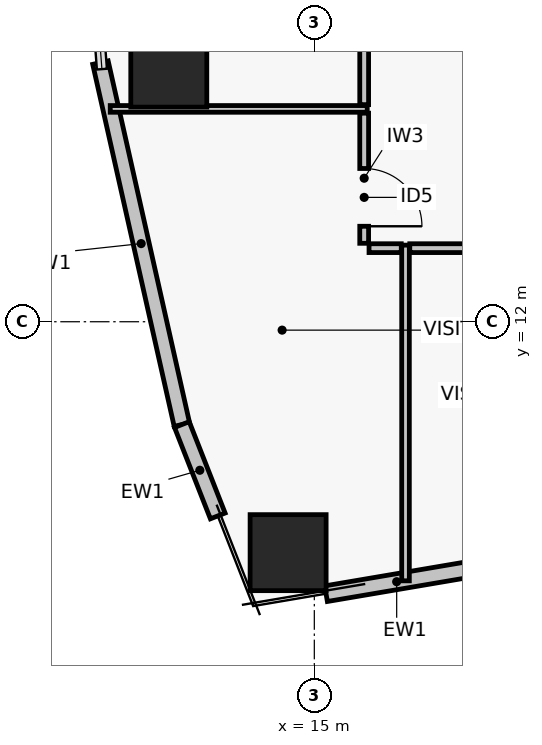
"""IFC4 building model, lengths in metres.
Left out: names, types, materials, properties, quantities, classifications, styles, units other than length and angle.
Written with IfcOpenShell. Run it as: python <this file> out.ifc"""

import sys

from ifc_helpers import new_model, si_unit, direction, frame, frame_2d, origin, origin_2d, place, context, subcontext, project, spatial, rectangle, hollow_rectangle, extrude, element, fill, save


model = new_model("IFC4")
c1 = context("Model", 3, precision=1e-05, world=origin(), true_north=direction((0.0, 1.0)))
c2 = subcontext(c1, "Body", "Model", "MODEL_VIEW")
j1 = project(units=[si_unit("LENGTHUNIT", "METRE"), si_unit("PLANEANGLEUNIT", "RADIAN")], contexts=[c1])
p1 = place(None, origin())
s1 = spatial("IfcSite", under=j1, at=p1, CompositionType="ELEMENT")
p2 = place(p1, origin())
s2 = spatial("IfcBuilding", under=s1, at=p2, CompositionType="ELEMENT")
p3 = place(p2, frame((0.0, 0.0, 79.68)))
s3 = spatial("IfcBuildingStorey", under=s2, at=p3, CompositionType="ELEMENT", Elevation=79.68)
for number, where, z_axis, x_axis in (
    (1, (12.607, 16.154, 0.0), (0.0, 0.0, 1.0), (1.0, 0.0, 0.0)),
    (2, (14.569, 8.203, 0.0), (0.0, 0.0, 1.0), (1.0, 0.0, 0.0)),
):
    element("IfcColumn", number, at=place(p3, frame(where, z_axis=z_axis, x_axis=x_axis)), inside=s3, PredefinedType="COLUMN", context=c2, shape_type="SweptSolid", body=[
        extrude(hollow_rectangle(XDim=1.25, YDim=1.25, WallThickness=0.05, at=origin_2d()), origin(), (0.0, 0.0, 1.0), 3.72),
    ])
p4 = place(p3, frame((12.822, 10.309, 0.0), z_axis=(0.0, 0.0, 1.0), x_axis=(-0.219535044336, 0.975604614743, 0.0)))
e3 = element("IfcWall", 3, at=p4, inside=s3, PredefinedType="PARTITIONING", context=c2, shape_type="SweptSolid", body=[
    extrude(rectangle(XDim=6.102, YDim=0.26, at=frame_2d((3.051, 0.0))), origin(), (0.0, 0.0, 1.0), 3.38),
])
p5 = place(p3, frame((13.412, 8.806, 0.0), z_axis=(0.0, 0.0, 1.0), x_axis=(-0.365488551504, 0.930815835018, 0.0)))
e4 = element("IfcWall", 4, at=p5, inside=s3, PredefinedType="PARTITIONING", context=c2, shape_type="SweptSolid", body=[
    extrude(rectangle(XDim=1.614, YDim=0.26, at=frame_2d((0.807, 0.0))), origin(), (0.0, 0.0, 1.0), 3.38),
])
p6 = place(p3, frame((17.516, 7.922, 0.0), z_axis=(0.0, 0.0, 1.0), x_axis=(-0.985905269947, -0.167304508875, 0.0)))
e5 = element("IfcWall", 5, at=p6, inside=s3, PredefinedType="PARTITIONING", context=c2, shape_type="SweptSolid", body=[
    extrude(rectangle(XDim=2.357, YDim=0.26, at=frame_2d((1.178, 0.0))), origin(), (0.0, 0.0, 1.0), 3.38),
])
p7 = place(p3, frame((15.82, 21.93, 0.0), z_axis=(0.0, 0.0, 1.0), x_axis=(0.0, -1.0, 0.0)))
e6 = element("IfcWall", 6, at=p7, inside=s3, PredefinedType="PARTITIONING", context=c2, shape_type="SweptSolid", body=[
    extrude(rectangle(XDim=6.36, YDim=0.145, at=frame_2d((3.18, 0.0))), origin(), (0.0, 0.0, 1.0), 2.51),
])
p8 = place(p7, frame((0.28, 0.0, 0.0)))
e7 = element("IfcOpeningElement", 7, at=p8, cuts=e6, PredefinedType="OPENING", context=c2, shape_type="SweptSolid", body=[
    extrude(rectangle(XDim=0.95, YDim=2.06, at=frame_2d((0.475, 1.03))), frame((0.0, 0.083, 0.0), z_axis=(0.0, -1.0, 0.0), x_axis=(1.0, 0.0, 0.0)), (0.0, 0.0, 1.0), 0.165),
])
p9 = place(p3, frame((15.82, 15.43, 0.0), z_axis=(0.0, 0.0, 1.0), x_axis=(0.0, -1.0, 0.0)))
e8 = element("IfcWall", 8, at=p9, inside=s3, PredefinedType="PARTITIONING", context=c2, shape_type="SweptSolid", body=[
    extrude(rectangle(XDim=2.14, YDim=0.145, at=frame_2d((1.07, 0.0))), origin(), (0.0, 0.0, 1.0), 2.91),
])
p10 = place(p9, frame((0.91, 0.0, 0.0)))
e9 = element("IfcOpeningElement", 9, at=p10, cuts=e8, PredefinedType="OPENING", context=c2, shape_type="SweptSolid", body=[
    extrude(rectangle(XDim=0.95, YDim=2.06, at=frame_2d((0.475, 1.03))), frame((0.0, 0.083, 0.0), z_axis=(0.0, -1.0, 0.0), x_axis=(1.0, 0.0, 0.0)), (0.0, 0.0, 1.0), 0.165),
])
p11 = place(p3, frame((15.9, 13.21, 0.0), z_axis=(0.0, 0.0, 1.0), x_axis=(1.0, 0.0, 0.0)))
e10 = element("IfcWall", 10, at=p11, inside=s3, PredefinedType="PARTITIONING", context=c2, shape_type="SweptSolid", body=[
    extrude(rectangle(XDim=0.53, YDim=0.145, at=frame_2d((0.265, 0.0))), origin(), (0.0, 0.0, 1.0), 2.51),
])
p12 = place(p3, frame((16.57, 13.21, 0.0), z_axis=(0.0, 0.0, 1.0), x_axis=(1.0, 0.0, 0.0)))
e11 = element("IfcWall", 11, at=p12, inside=s3, PredefinedType="PARTITIONING", context=c2, shape_type="SweptSolid", body=[
    extrude(rectangle(XDim=15.214, YDim=0.145, at=frame_2d((7.607, 0.0))), origin(), (0.0, 0.0, 1.0), 2.51),
])
p13 = place(p12, frame((10.029, 0.0, 0.0)))
e12 = element("IfcOpeningElement", 12, at=p13, cuts=e11, PredefinedType="OPENING", context=c2, shape_type="SweptSolid", body=[
    extrude(rectangle(XDim=0.92, YDim=2.05, at=frame_2d((0.46, 1.025))), frame((0.0, 0.083, 0.0), z_axis=(0.0, -1.0, 0.0), x_axis=(1.0, 0.0, 0.0)), (0.0, 0.0, 1.0), 0.165),
])
p14 = place(p3, frame((16.5, 7.739, 0.0), z_axis=(0.0, 0.0, 1.0), x_axis=(0.0, 1.0, 0.0)))
e13 = element("IfcWall", 13, at=p14, inside=s3, PredefinedType="PARTITIONING", context=c2, shape_type="SweptSolid", body=[
    extrude(rectangle(XDim=5.521, YDim=0.125, at=frame_2d((2.76, 0.0))), origin(), (0.0, 0.0, 1.0), 2.51),
])
p15 = place(p3, frame((11.644, 15.5, 0.0), z_axis=(0.0, 0.0, 1.0), x_axis=(1.0, 0.0, 0.0)))
e14 = element("IfcWall", 14, at=p15, inside=s3, PredefinedType="PARTITIONING", context=c2, shape_type="SweptSolid", body=[
    extrude(rectangle(XDim=4.227, YDim=0.11, at=frame_2d((2.113, 0.0))), origin(), (0.0, 0.0, 1.0), 2.76),
])
p16 = place(p10, origin())
e15 = element("IfcDoor", 15, at=p16, inside=s3, OperationType="SINGLE_SWING_RIGHT", PredefinedType="DOOR", context=c2, shape_type="SweptSolid", body=[
    extrude(rectangle(XDim=0.95, YDim=2.06, at=frame_2d((0.475, 1.03))), frame((0.0, 0.025, 0.0), z_axis=(0.0, -1.0, 0.0), x_axis=(1.0, 0.0, 0.0)), (0.0, 0.0, 1.0), 0.05),
])
fill(e9, e15)
save(model, sys.argv[1])
